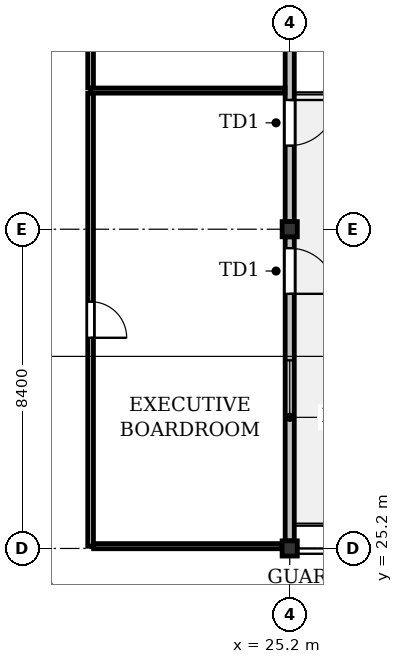
"""IFC4 building model, lengths in metres.
Left out: names, types, materials, properties, quantities, classifications, styles, units other than length and angle.
Written with IfcOpenShell. Run it as: python <this file> out.ifc"""

import sys

from ifc_helpers import new_model, si_unit, direction, frame, frame_2d, origin, origin_2d, place, context, subcontext, project, spatial, rectangle, i_section, extrude, element, fill, save


model = new_model("IFC4")
c1 = context("Model", 3, precision=1e-05, world=origin(), true_north=direction((0.0, 1.0)))
c2 = subcontext(c1, "Body", "Model", "MODEL_VIEW")
j1 = project(units=[si_unit("LENGTHUNIT", "METRE"), si_unit("PLANEANGLEUNIT", "RADIAN")], contexts=[c1])
p1 = place(None, origin())
s1 = spatial("IfcSite", under=j1, at=p1, CompositionType="ELEMENT")
p2 = place(p1, origin())
s2 = spatial("IfcBuilding", under=s1, at=p2, CompositionType="ELEMENT")
p3 = place(p2, frame((0.0, 0.0, 154.1)))
s3 = spatial("IfcBuildingStorey", under=s2, at=p3, CompositionType="ELEMENT", Elevation=154.1)
for number, where, z_axis, x_axis in (
    (1, (25.2, 25.2, 0.0), (0.0, 0.0, 1.0), (1.0, 0.0, 0.0)),
    (2, (25.2, 33.6, 0.0), (0.0, 0.0, 1.0), (1.0, 0.0, 0.0)),
):
    element("IfcColumn", number, at=place(p3, frame(where, z_axis=z_axis, x_axis=x_axis)), inside=s3, PredefinedType="COLUMN", context=c2, shape_type="SweptSolid", body=[
        extrude(i_section(OverallWidth=0.4, OverallDepth=0.4, WebThickness=0.025, FlangeThickness=0.04, at=origin_2d()), origin(), (0.0, 0.0, 1.0), 4.1),
    ])
p4 = place(p3, frame((25.2, 41.8, 0.0), z_axis=(0.0, 0.0, 1.0), x_axis=(0.0, -1.0, 0.0)))
e3 = element("IfcWall", 3, at=p4, inside=s3, PredefinedType="STANDARD", context=c2, shape_type="SweptSolid", body=[
    extrude(rectangle(XDim=8.0, YDim=0.24, at=frame_2d((4.0, 0.0))), origin(), (0.0, 0.0, 1.0), 3.422),
])
p5 = place(p4, frame((4.8, 0.0, 0.0)))
e4 = element("IfcOpeningElement", 4, at=p5, cuts=e3, PredefinedType="OPENING", context=c2, shape_type="SweptSolid", body=[
    extrude(rectangle(XDim=1.2, YDim=2.2, at=frame_2d((0.6, 1.1))), frame((0.0, 0.13, 0.0), z_axis=(0.0, -1.0, 0.0), x_axis=(1.0, 0.0, 0.0)), (0.0, 0.0, 1.0), 0.26),
])
p6 = place(p4, frame((1.411, 0.0, 0.9)))
e5 = element("IfcOpeningElement", 5, at=p6, cuts=e3, PredefinedType="OPENING", context=c2, shape_type="SweptSolid", body=[
    extrude(rectangle(XDim=1.8, YDim=1.6, at=frame_2d((0.9, 0.8))), frame((0.0, 0.13, 0.0), z_axis=(0.0, -1.0, 0.0), x_axis=(1.0, 0.0, 0.0)), (0.0, 0.0, 1.0), 0.26),
])
p7 = place(p3, frame((25.2, 33.4, 0.0), z_axis=(0.0, 0.0, 1.0), x_axis=(0.0, -1.0, 0.0)))
e6 = element("IfcWall", 6, at=p7, inside=s3, PredefinedType="STANDARD", context=c2, shape_type="SweptSolid", body=[
    extrude(rectangle(XDim=8.0, YDim=0.24, at=frame_2d((4.0, 0.0))), origin(), (0.0, 0.0, 1.0), 3.422),
])
p8 = place(p7, frame((0.3, 0.0, 0.0)))
e7 = element("IfcOpeningElement", 7, at=p8, cuts=e6, PredefinedType="OPENING", context=c2, shape_type="SweptSolid", body=[
    extrude(rectangle(XDim=1.2, YDim=2.2, at=frame_2d((0.6, 1.1))), frame((0.0, 0.13, 0.0), z_axis=(0.0, -1.0, 0.0), x_axis=(1.0, 0.0, 0.0)), (0.0, 0.0, 1.0), 0.26),
])
p9 = place(p7, frame((3.25, 0.0, 0.9)))
e8 = element("IfcOpeningElement", 8, at=p9, cuts=e6, PredefinedType="OPENING", context=c2, shape_type="SweptSolid", body=[
    extrude(rectangle(XDim=1.5, YDim=1.6, at=frame_2d((0.75, 0.8))), frame((0.0, 0.13, 0.0), z_axis=(0.0, -1.0, 0.0), x_axis=(1.0, 0.0, 0.0)), (0.0, 0.0, 1.0), 0.26),
])
p10 = place(p3, frame((25.076, 37.248, 0.0), z_axis=(0.0, 0.0, 1.0), x_axis=(-1.0, 0.0, 0.0)))
e9 = element("IfcWall", 9, at=p10, inside=s3, PredefinedType="PARTITIONING", context=c2, shape_type="SweptSolid", body=[
    extrude(rectangle(XDim=5.116, YDim=0.135, at=frame_2d((2.558, 0.0))), origin(), (0.0, 0.0, 1.0), 3.469),
])
p11 = place(p3, frame((19.96, 37.177, 0.0), z_axis=(0.0, 0.0, 1.0), x_axis=(0.0, -1.0, 0.0)))
e10 = element("IfcWall", 10, at=p11, inside=s3, PredefinedType="PARTITIONING", context=c2, shape_type="SweptSolid", body=[
    extrude(rectangle(XDim=11.917, YDim=0.15, at=frame_2d((5.958, 0.0))), origin(), (0.0, 0.0, 1.0), 3.292),
])
p12 = place(p11, frame((5.483, 0.0, 0.0)))
e11 = element("IfcOpeningElement", 11, at=p12, cuts=e10, PredefinedType="OPENING", context=c2, shape_type="SweptSolid", body=[
    extrude(rectangle(XDim=0.95, YDim=2.15, at=frame_2d((0.475, 1.075))), frame((0.0, 0.085, 0.0), z_axis=(0.0, -1.0, 0.0), x_axis=(1.0, 0.0, 0.0)), (0.0, 0.0, 1.0), 0.17),
])
p13 = place(p3, frame((20.039, 25.26, 0.0), z_axis=(0.0, 0.0, 1.0), x_axis=(1.0, 0.0, 0.0)))
e12 = element("IfcWall", 12, at=p13, inside=s3, PredefinedType="PARTITIONING", context=c2, shape_type="SweptSolid", body=[
    extrude(rectangle(XDim=4.941, YDim=0.135, at=frame_2d((2.47, 0.0))), origin(), (0.0, 0.0, 1.0), 3.292),
])
p14 = place(p3, frame((19.96, 43.0, 0.0), z_axis=(0.0, 0.0, 1.0), x_axis=(0.0, -1.0, 0.0)))
e13 = element("IfcWall", 13, at=p14, inside=s3, PredefinedType="PARTITIONING", context=c2, shape_type="SweptSolid", body=[
    extrude(rectangle(XDim=5.68, YDim=0.15, at=frame_2d((2.84, 0.0))), origin(), (0.0, 0.0, 1.0), 3.292),
])
p15 = place(p14, frame((2.365, 0.0, 0.0)))
e14 = element("IfcOpeningElement", 14, at=p15, cuts=e13, PredefinedType="OPENING", context=c2, shape_type="SweptSolid", body=[
    extrude(rectangle(XDim=0.95, YDim=2.15, at=frame_2d((0.475, 1.075))), frame((0.0, 0.085, 0.0), z_axis=(0.0, -1.0, 0.0), x_axis=(1.0, 0.0, 0.0)), (0.0, 0.0, 1.0), 0.17),
])
p16 = place(p5, origin())
e15 = element("IfcDoor", 15, at=p16, inside=s3, OperationType="SINGLE_SWING_LEFT", PredefinedType="DOOR", context=c2, shape_type="SweptSolid", body=[
    extrude(rectangle(XDim=1.2, YDim=2.2, at=frame_2d((0.6, 1.1))), frame((0.0, 0.025, 0.0), z_axis=(0.0, -1.0, 0.0), x_axis=(1.0, 0.0, 0.0)), (0.0, 0.0, 1.0), 0.05),
])
fill(e4, e15)
p17 = place(p8, origin())
e16 = element("IfcDoor", 16, at=p17, inside=s3, OperationType="SINGLE_SWING_RIGHT", PredefinedType="DOOR", context=c2, shape_type="SweptSolid", body=[
    extrude(rectangle(XDim=1.2, YDim=2.2, at=frame_2d((0.6, 1.1))), frame((0.0, 0.025, 0.0), z_axis=(0.0, -1.0, 0.0), x_axis=(1.0, 0.0, 0.0)), (0.0, 0.0, 1.0), 0.05),
])
fill(e7, e16)
p18 = place(p9, origin())
e17 = element("IfcWindow", 17, at=p18, inside=s3, PartitioningType="SINGLE_PANEL", PredefinedType="WINDOW", context=c2, shape_type="SweptSolid", body=[
    extrude(rectangle(XDim=1.5, YDim=1.6, at=frame_2d((0.75, 0.8))), frame((0.0, 0.03, 0.0), z_axis=(0.0, -1.0, 0.0), x_axis=(1.0, 0.0, 0.0)), (0.0, 0.0, 1.0), 0.06),
])
fill(e8, e17)
p19 = place(p12, origin())
e18 = element("IfcDoor", 18, at=p19, inside=s3, OperationType="SINGLE_SWING_RIGHT", PredefinedType="DOOR", context=c2, shape_type="SweptSolid", body=[
    extrude(rectangle(XDim=0.95, YDim=2.15, at=frame_2d((0.475, 1.075))), frame((0.0, 0.025, 0.0), z_axis=(0.0, -1.0, 0.0), x_axis=(1.0, 0.0, 0.0)), (0.0, 0.0, 1.0), 0.05),
])
fill(e11, e18)
save(model, sys.argv[1])
